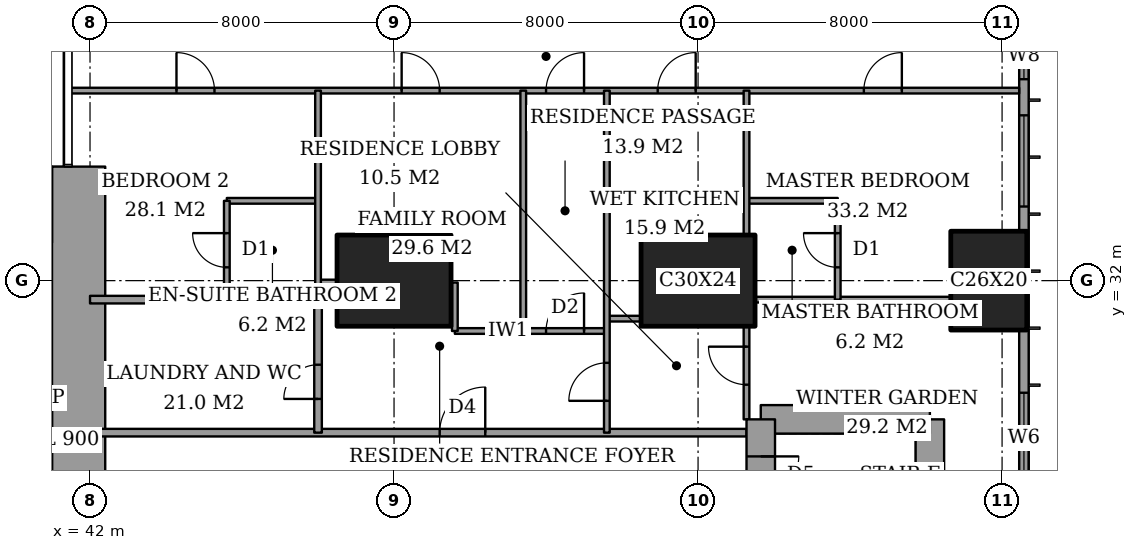
"""IFC4 building model, lengths in metres.
Left out: names, types, materials, properties, quantities, classifications, styles, units other than length and angle.
Written with IfcOpenShell. Run it as: python <this file> out.ifc"""

import sys

from ifc_helpers import new_model, si_unit, direction, frame, frame_2d, origin, origin_2d, place, context, subcontext, project, spatial, rectangle, extrude, element, fill, save


model = new_model("IFC4")
c1 = context("Model", 3, precision=1e-05, world=origin(), true_north=direction((0.0, 1.0)))
c2 = subcontext(c1, "Body", "Model", "MODEL_VIEW")
j1 = project(units=[si_unit("LENGTHUNIT", "METRE"), si_unit("PLANEANGLEUNIT", "RADIAN")], contexts=[c1])
p1 = place(None, origin())
s1 = spatial("IfcSite", under=j1, at=p1, CompositionType="ELEMENT")
p2 = place(p1, origin())
s2 = spatial("IfcBuilding", under=s1, at=p2, CompositionType="ELEMENT")
p3 = place(p2, frame((0.0, 0.0, 54.8)))
s3 = spatial("IfcBuildingStorey", under=s2, at=p3, CompositionType="ELEMENT", Elevation=54.8)
for number, where, z_axis, x_axis in (
    (1, (50.0, 32.0, 0.0), (0.0, 0.0, 1.0), (1.0, 0.0, 0.0)),
    (2, (58.0, 32.0, 0.0), (0.0, 0.0, 1.0), (1.0, 0.0, 0.0)),
):
    element("IfcColumn", number, at=place(p3, frame(where, z_axis=z_axis, x_axis=x_axis)), inside=s3, PredefinedType="COLUMN", context=c2, shape_type="SweptSolid", body=[
        extrude(rectangle(XDim=3.0, YDim=2.4, at=origin_2d()), origin(), (0.0, 0.0, 1.0), 3.6),
    ])
p4 = place(p3, frame((65.65, 32.0, 0.0), z_axis=(0.0, 0.0, 1.0), x_axis=(0.0, 1.0, 0.0)))
e3 = element("IfcColumn", 3, at=p4, inside=s3, PredefinedType="COLUMN", context=c2, shape_type="SweptSolid", body=[
    extrude(rectangle(XDim=2.6, YDim=2.0, at=origin_2d()), origin(), (0.0, 0.0, 1.0), 3.6),
])
p5 = place(p3, frame((41.7, 24.85, 0.0), z_axis=(0.0, 0.0, 1.0), x_axis=(0.0, 1.0, 0.0)))
e4 = element("IfcWall", 4, at=p5, inside=s3, PredefinedType="SHEAR", context=c2, shape_type="SweptSolid", body=[
    extrude(rectangle(XDim=10.15, YDim=1.4, at=frame_2d((5.075, 0.0))), origin(), (0.0, 0.0, 1.0), 3.6),
])
p6 = place(p3, frame((64.1, 19.65, 0.0), z_axis=(0.0, 0.0, 1.0), x_axis=(0.0, 1.0, 0.0)))
e5 = element("IfcWall", 5, at=p6, inside=s3, PredefinedType="SHEAR", context=c2, shape_type="SweptSolid", body=[
    extrude(rectangle(XDim=8.7, YDim=0.75, at=frame_2d((4.35, 0.0))), origin(), (0.0, 0.0, 1.0), 3.6),
])
p7 = place(p3, frame((64.1, 28.35, 0.0), z_axis=(0.0, 0.0, 1.0), x_axis=(-1.0, 0.0, 0.0)))
e6 = element("IfcWall", 6, at=p7, inside=s3, PredefinedType="SHEAR", context=c2, shape_type="SweptSolid", body=[
    extrude(rectangle(XDim=4.45, YDim=0.75, at=frame_2d((2.225, 0.0))), origin(), (0.0, 0.0, 1.0), 3.6),
])
p8 = place(p3, frame((59.65, 28.35, 0.0), z_axis=(0.0, 0.0, 1.0), x_axis=(0.0, -1.0, 0.0)))
e7 = element("IfcWall", 7, at=p8, inside=s3, PredefinedType="SHEAR", context=c2, shape_type="SweptSolid", body=[
    extrude(rectangle(XDim=8.7, YDim=0.75, at=frame_2d((4.35, 0.0))), origin(), (0.0, 0.0, 1.0), 3.6),
])
p9 = place(p8, frame((0.975, 0.0, 0.0)))
e8 = element("IfcOpeningElement", 8, at=p9, cuts=e7, PredefinedType="OPENING", context=c2, shape_type="SweptSolid", body=[
    extrude(rectangle(XDim=1.0, YDim=2.1, at=frame_2d((0.5, 1.05))), frame((0.0, 0.385, 0.0), z_axis=(0.0, -1.0, 0.0), x_axis=(1.0, 0.0, 0.0)), (0.0, 0.0, 1.0), 0.77),
])
p10 = place(p3, frame((66.575, 3.175, 0.0), z_axis=(0.0, 0.0, 1.0), x_axis=(0.0, 1.0, 0.0)))
e9 = element("IfcWall", 9, at=p10, inside=s3, PredefinedType="SOLIDWALL", context=c2, shape_type="SweptSolid", body=[
    extrude(rectangle(XDim=41.65, YDim=0.25, at=frame_2d((20.825, 0.0))), origin(), (0.0, 0.0, 1.0), 3.6),
])
p11 = place(p10, frame((0.775, 0.0, 0.6)))
e10 = element("IfcOpeningElement", 10, at=p11, cuts=e9, PredefinedType="OPENING", context=c2, shape_type="SweptSolid", body=[
    extrude(rectangle(XDim=2.4, YDim=2.0, at=frame_2d((1.2, 1.0))), frame((0.0, 0.135, 0.0), z_axis=(0.0, -1.0, 0.0), x_axis=(1.0, 0.0, 0.0)), (0.0, 0.0, 1.0), 0.27),
])
p12 = place(p10, frame((6.125, 0.0, 0.6)))
e11 = element("IfcOpeningElement", 11, at=p12, cuts=e9, PredefinedType="OPENING", context=c2, shape_type="SweptSolid", body=[
    extrude(rectangle(XDim=1.2, YDim=2.0, at=frame_2d((0.6, 1.0))), frame((0.0, 0.135, 0.0), z_axis=(0.0, -1.0, 0.0), x_axis=(1.0, 0.0, 0.0)), (0.0, 0.0, 1.0), 0.27),
])
p13 = place(p10, frame((8.375, 0.0, 0.6)))
e12 = element("IfcOpeningElement", 12, at=p13, cuts=e9, PredefinedType="OPENING", context=c2, shape_type="SweptSolid", body=[
    extrude(rectangle(XDim=2.4, YDim=2.0, at=frame_2d((1.2, 1.0))), frame((0.0, 0.135, 0.0), z_axis=(0.0, -1.0, 0.0), x_axis=(1.0, 0.0, 0.0)), (0.0, 0.0, 1.0), 0.27),
])
p14 = place(p10, frame((15.775, 0.0, 0.6)))
e13 = element("IfcOpeningElement", 13, at=p14, cuts=e9, PredefinedType="OPENING", context=c2, shape_type="SweptSolid", body=[
    extrude(rectangle(XDim=2.4, YDim=2.0, at=frame_2d((1.2, 1.0))), frame((0.0, 0.135, 0.0), z_axis=(0.0, -1.0, 0.0), x_axis=(1.0, 0.0, 0.0)), (0.0, 0.0, 1.0), 0.27),
])
p15 = place(p10, frame((23.475, 0.0, 0.6)))
e14 = element("IfcOpeningElement", 14, at=p15, cuts=e9, PredefinedType="OPENING", context=c2, shape_type="SweptSolid", body=[
    extrude(rectangle(XDim=2.4, YDim=2.0, at=frame_2d((1.2, 1.0))), frame((0.0, 0.135, 0.0), z_axis=(0.0, -1.0, 0.0), x_axis=(1.0, 0.0, 0.0)), (0.0, 0.0, 1.0), 0.27),
])
p16 = place(p10, frame((30.775, 0.0, 0.6)))
e15 = element("IfcOpeningElement", 15, at=p16, cuts=e9, PredefinedType="OPENING", context=c2, shape_type="SweptSolid", body=[
    extrude(rectangle(XDim=2.4, YDim=2.0, at=frame_2d((1.2, 1.0))), frame((0.0, 0.135, 0.0), z_axis=(0.0, -1.0, 0.0), x_axis=(1.0, 0.0, 0.0)), (0.0, 0.0, 1.0), 0.27),
])
p17 = place(p10, frame((34.125, 0.0, 0.6)))
e16 = element("IfcOpeningElement", 16, at=p17, cuts=e9, PredefinedType="OPENING", context=c2, shape_type="SweptSolid", body=[
    extrude(rectangle(XDim=1.2, YDim=2.0, at=frame_2d((0.6, 1.0))), frame((0.0, 0.135, 0.0), z_axis=(0.0, -1.0, 0.0), x_axis=(1.0, 0.0, 0.0)), (0.0, 0.0, 1.0), 0.27),
])
p18 = place(p10, frame((38.475, 0.0, 0.6)))
e17 = element("IfcOpeningElement", 17, at=p18, cuts=e9, PredefinedType="OPENING", context=c2, shape_type="SweptSolid", body=[
    extrude(rectangle(XDim=2.4, YDim=2.0, at=frame_2d((1.2, 1.0))), frame((0.0, 0.135, 0.0), z_axis=(0.0, -1.0, 0.0), x_axis=(1.0, 0.0, 0.0)), (0.0, 0.0, 1.0), 0.27),
])
p19 = place(p3, frame((42.0, 28.0, 0.0), z_axis=(0.0, 0.0, 1.0), x_axis=(1.0, 0.0, 0.0)))
e18 = element("IfcWall", 18, at=p19, inside=s3, PredefinedType="PARTITIONING", context=c2, shape_type="SweptSolid", body=[
    extrude(rectangle(XDim=17.275, YDim=0.2, at=frame_2d((8.637, 0.0))), origin(), (0.0, 0.0, 1.0), 3.35),
])
p20 = place(p19, frame((9.2, 0.0, 0.0)))
e19 = element("IfcOpeningElement", 19, at=p20, cuts=e18, PredefinedType="OPENING", context=c2, shape_type="SweptSolid", body=[
    extrude(rectangle(XDim=1.2, YDim=2.4, at=frame_2d((0.6, 1.2))), frame((0.0, 0.11, 0.0), z_axis=(0.0, -1.0, 0.0), x_axis=(1.0, 0.0, 0.0)), (0.0, 0.0, 1.0), 0.22),
])
p21 = place(p3, frame((51.6, 30.675, 0.0), z_axis=(0.0, 0.0, 1.0), x_axis=(1.0, 0.0, 0.0)))
e20 = element("IfcWall", 20, at=p21, inside=s3, PredefinedType="PARTITIONING", context=c2, shape_type="SweptSolid", body=[
    extrude(rectangle(XDim=4.0, YDim=0.15, at=frame_2d((2.0, 0.0))), origin(), (0.0, 0.0, 1.0), 3.35),
])
p22 = place(p21, frame((2.4, 0.0, 0.0)))
e21 = element("IfcOpeningElement", 21, at=p22, cuts=e20, PredefinedType="OPENING", context=c2, shape_type="SweptSolid", body=[
    extrude(rectangle(XDim=1.0, YDim=2.1, at=frame_2d((0.5, 1.05))), frame((0.0, 0.085, 0.0), z_axis=(0.0, -1.0, 0.0), x_axis=(1.0, 0.0, 0.0)), (0.0, 0.0, 1.0), 0.17),
])
p23 = place(p3, frame((55.6, 31.0, 0.0), z_axis=(0.0, 0.0, 1.0), x_axis=(1.0, 0.0, 0.0)))
e22 = element("IfcWall", 22, at=p23, inside=s3, PredefinedType="PARTITIONING", context=c2, shape_type="SweptSolid", body=[
    extrude(rectangle(XDim=0.9, YDim=0.15, at=frame_2d((0.45, 0.0))), origin(), (0.0, 0.0, 1.0), 3.35),
])
p24 = place(p3, frame((42.0, 31.5, 0.0), z_axis=(0.0, 0.0, 1.0), x_axis=(1.0, 0.0, 0.0)))
e23 = element("IfcWall", 23, at=p24, inside=s3, PredefinedType="PARTITIONING", context=c2, shape_type="SweptSolid", body=[
    extrude(rectangle(XDim=6.0, YDim=0.2, at=frame_2d((3.0, 0.0))), origin(), (0.0, 0.0, 1.0), 3.35),
])
p25 = place(p3, frame((59.5, 31.5, 0.0), z_axis=(0.0, 0.0, 1.0), x_axis=(1.0, 0.0, 0.0)))
e24 = element("IfcWall", 24, at=p25, inside=s3, PredefinedType="PARTITIONING", context=c2, shape_type="SweptSolid", body=[
    extrude(rectangle(XDim=5.15, YDim=0.15, at=frame_2d((2.575, 0.0))), origin(), (0.0, 0.0, 1.0), 3.35),
])
p26 = place(p3, frame((48.0, 31.95, 0.0), z_axis=(0.0, 0.0, 1.0), x_axis=(1.0, 0.0, 0.0)))
e25 = element("IfcWall", 25, at=p26, inside=s3, PredefinedType="PARTITIONING", context=c2, shape_type="SweptSolid", body=[
    extrude(rectangle(XDim=0.5, YDim=0.15, at=frame_2d((0.25, 0.0))), origin(), (0.0, 0.0, 1.0), 2.634),
])
p27 = place(p3, frame((45.6, 34.1, 0.0), z_axis=(0.0, 0.0, 1.0), x_axis=(1.0, 0.0, 0.0)))
e26 = element("IfcWall", 26, at=p27, inside=s3, PredefinedType="PARTITIONING", context=c2, shape_type="SweptSolid", body=[
    extrude(rectangle(XDim=2.4, YDim=0.15, at=frame_2d((1.2, 0.0))), origin(), (0.0, 0.0, 1.0), 3.35),
])
p28 = place(p3, frame((59.275, 34.1, 0.0), z_axis=(0.0, 0.0, 1.0), x_axis=(1.0, 0.0, 0.0)))
e27 = element("IfcWall", 27, at=p28, inside=s3, PredefinedType="PARTITIONING", context=c2, shape_type="SweptSolid", body=[
    extrude(rectangle(XDim=2.4, YDim=0.15, at=frame_2d((1.2, 0.0))), origin(), (0.0, 0.0, 1.0), 3.35),
])
p29 = place(p3, frame((41.439, 37.0, 0.0), z_axis=(0.0, 0.0, 1.0), x_axis=(1.0, 0.0, 0.0)))
e28 = element("IfcWall", 28, at=p29, inside=s3, PredefinedType="PARTITIONING", context=c2, shape_type="SweptSolid", body=[
    extrude(rectangle(XDim=25.011, YDim=0.15, at=frame_2d((12.505, 0.0))), origin(), (0.0, 0.0, 1.0), 3.35),
])
p30 = place(p29, frame((12.561, 0.0, 0.0)))
e29 = element("IfcOpeningElement", 29, at=p30, cuts=e28, PredefinedType="OPENING", context=c2, shape_type="SweptSolid", body=[
    extrude(rectangle(XDim=1.0, YDim=2.1, at=frame_2d((0.5, 1.05))), frame((0.0, 0.085, 0.0), z_axis=(0.0, -1.0, 0.0), x_axis=(1.0, 0.0, 0.0)), (0.0, 0.0, 1.0), 0.17),
])
p31 = place(p29, frame((20.924, 0.0, 0.0)))
e30 = element("IfcOpeningElement", 30, at=p31, cuts=e28, PredefinedType="OPENING", context=c2, shape_type="SweptSolid", body=[
    extrude(rectangle(XDim=1.0, YDim=2.1, at=frame_2d((0.5, 1.05))), frame((0.0, 0.085, 0.0), z_axis=(0.0, -1.0, 0.0), x_axis=(1.0, 0.0, 0.0)), (0.0, 0.0, 1.0), 0.17),
])
p32 = place(p29, frame((15.499, 0.0, 0.0)))
e31 = element("IfcOpeningElement", 31, at=p32, cuts=e28, PredefinedType="OPENING", context=c2, shape_type="SweptSolid", body=[
    extrude(rectangle(XDim=1.0, YDim=2.1, at=frame_2d((0.5, 1.05))), frame((0.0, 0.085, 0.0), z_axis=(0.0, -1.0, 0.0), x_axis=(1.0, 0.0, 0.0)), (0.0, 0.0, 1.0), 0.17),
])
p33 = place(p29, frame((8.761, 0.0, 0.0)))
e32 = element("IfcOpeningElement", 32, at=p33, cuts=e28, PredefinedType="OPENING", context=c2, shape_type="SweptSolid", body=[
    extrude(rectangle(XDim=1.0, YDim=2.1, at=frame_2d((0.5, 1.05))), frame((0.0, 0.085, 0.0), z_axis=(0.0, -1.0, 0.0), x_axis=(1.0, 0.0, 0.0)), (0.0, 0.0, 1.0), 0.17),
])
p34 = place(p29, frame((2.836, 0.0, 0.0)))
e33 = element("IfcOpeningElement", 33, at=p34, cuts=e28, PredefinedType="OPENING", context=c2, shape_type="SweptSolid", body=[
    extrude(rectangle(XDim=1.0, YDim=2.1, at=frame_2d((0.5, 1.05))), frame((0.0, 0.085, 0.0), z_axis=(0.0, -1.0, 0.0), x_axis=(1.0, 0.0, 0.0)), (0.0, 0.0, 1.0), 0.17),
])
p35 = place(p3, frame((45.6, 31.5, 0.0), z_axis=(0.0, 0.0, 1.0), x_axis=(0.0, 1.0, 0.0)))
e34 = element("IfcWall", 34, at=p35, inside=s3, PredefinedType="PARTITIONING", context=c2, shape_type="SweptSolid", body=[
    extrude(rectangle(XDim=2.6, YDim=0.15, at=frame_2d((1.3, 0.0))), origin(), (0.0, 0.0, 1.0), 3.35),
])
p36 = place(p35, frame((0.85, 0.0, 0.0)))
e35 = element("IfcOpeningElement", 35, at=p36, cuts=e34, PredefinedType="OPENING", context=c2, shape_type="SweptSolid", body=[
    extrude(rectangle(XDim=0.9, YDim=2.1, at=frame_2d((0.45, 1.05))), frame((0.0, 0.085, 0.0), z_axis=(0.0, -1.0, 0.0), x_axis=(1.0, 0.0, 0.0)), (0.0, 0.0, 1.0), 0.17),
])
p37 = place(p3, frame((48.0, 28.0, 0.0), z_axis=(0.0, 0.0, 1.0), x_axis=(0.0, 1.0, 0.0)))
e36 = element("IfcWall", 36, at=p37, inside=s3, PredefinedType="PARTITIONING", context=c2, shape_type="SweptSolid", body=[
    extrude(rectangle(XDim=3.5, YDim=0.2, at=frame_2d((1.75, 0.0))), origin(), (0.0, 0.0, 1.0), 3.35),
])
p38 = place(p37, frame((0.887, 0.0, 0.0)))
e37 = element("IfcOpeningElement", 37, at=p38, cuts=e36, PredefinedType="OPENING", context=c2, shape_type="SweptSolid", body=[
    extrude(rectangle(XDim=0.9, YDim=2.1, at=frame_2d((0.45, 1.05))), frame((0.0, 0.11, 0.0), z_axis=(0.0, -1.0, 0.0), x_axis=(1.0, 0.0, 0.0)), (0.0, 0.0, 1.0), 0.22),
])
p39 = place(p3, frame((48.0, 31.5, 0.0), z_axis=(0.0, 0.0, 1.0), x_axis=(0.0, 1.0, 0.0)))
e38 = element("IfcWall", 38, at=p39, inside=s3, PredefinedType="PARTITIONING", context=c2, shape_type="SweptSolid", body=[
    extrude(rectangle(XDim=5.5, YDim=0.15, at=frame_2d((2.75, 0.0))), origin(), (0.0, 0.0, 1.0), 3.35),
])
p40 = place(p3, frame((51.6, 30.675, 0.0), z_axis=(0.0, 0.0, 1.0), x_axis=(0.0, 1.0, 0.0)))
e39 = element("IfcWall", 39, at=p40, inside=s3, PredefinedType="PARTITIONING", context=c2, shape_type="SweptSolid", body=[
    extrude(rectangle(XDim=1.275, YDim=0.15, at=frame_2d((0.637, 0.0))), origin(), (0.0, 0.0, 1.0), 3.35),
])
p41 = place(p3, frame((53.4, 30.675, 0.0), z_axis=(0.0, 0.0, 1.0), x_axis=(0.0, 1.0, 0.0)))
e40 = element("IfcWall", 40, at=p41, inside=s3, PredefinedType="PARTITIONING", context=c2, shape_type="SweptSolid", body=[
    extrude(rectangle(XDim=6.325, YDim=0.15, at=frame_2d((3.163, 0.0))), origin(), (0.0, 0.0, 1.0), 3.35),
])
p42 = place(p3, frame((55.6, 28.0, 0.0), z_axis=(0.0, 0.0, 1.0), x_axis=(0.0, 1.0, 0.0)))
e41 = element("IfcWall", 41, at=p42, inside=s3, PredefinedType="PARTITIONING", context=c2, shape_type="SweptSolid", body=[
    extrude(rectangle(XDim=9.0, YDim=0.15, at=frame_2d((4.5, 0.0))), origin(), (0.0, 0.0, 1.0), 3.35),
])
p43 = place(p42, frame((0.837, 0.0, 0.0)))
e42 = element("IfcOpeningElement", 42, at=p43, cuts=e41, PredefinedType="OPENING", context=c2, shape_type="SweptSolid", body=[
    extrude(rectangle(XDim=1.0, YDim=2.1, at=frame_2d((0.5, 1.05))), frame((0.0, 0.085, 0.0), z_axis=(0.0, -1.0, 0.0), x_axis=(1.0, 0.0, 0.0)), (0.0, 0.0, 1.0), 0.17),
])
p44 = place(p3, frame((59.275, 28.35, 0.0), z_axis=(0.0, 0.0, 1.0), x_axis=(0.0, 1.0, 0.0)))
e43 = element("IfcWall", 43, at=p44, inside=s3, PredefinedType="PARTITIONING", context=c2, shape_type="SweptSolid", body=[
    extrude(rectangle(XDim=2.45, YDim=0.15, at=frame_2d((1.225, 0.0))), origin(), (0.0, 0.0, 1.0), 3.35),
])
p45 = place(p44, frame((0.913, 0.0, 0.0)))
e44 = element("IfcOpeningElement", 44, at=p45, cuts=e43, PredefinedType="OPENING", context=c2, shape_type="SweptSolid", body=[
    extrude(rectangle(XDim=1.0, YDim=2.1, at=frame_2d((0.5, 1.05))), frame((0.0, 0.085, 0.0), z_axis=(0.0, -1.0, 0.0), x_axis=(1.0, 0.0, 0.0)), (0.0, 0.0, 1.0), 0.17),
])
p46 = place(p3, frame((59.275, 33.2, 0.0), z_axis=(0.0, 0.0, 1.0), x_axis=(0.0, 1.0, 0.0)))
e45 = element("IfcWall", 45, at=p46, inside=s3, PredefinedType="PARTITIONING", context=c2, shape_type="SweptSolid", body=[
    extrude(rectangle(XDim=3.8, YDim=0.15, at=frame_2d((1.9, 0.0))), origin(), (0.0, 0.0, 1.0), 3.35),
])
p47 = place(p3, frame((61.675, 31.5, 0.0), z_axis=(0.0, 0.0, 1.0), x_axis=(0.0, 1.0, 0.0)))
e46 = element("IfcWall", 46, at=p47, inside=s3, PredefinedType="PARTITIONING", context=c2, shape_type="SweptSolid", body=[
    extrude(rectangle(XDim=2.6, YDim=0.15, at=frame_2d((1.3, 0.0))), origin(), (0.0, 0.0, 1.0), 3.35),
])
p48 = place(p47, frame((0.85, 0.0, 0.0)))
e47 = element("IfcOpeningElement", 47, at=p48, cuts=e46, PredefinedType="OPENING", context=c2, shape_type="SweptSolid", body=[
    extrude(rectangle(XDim=0.9, YDim=2.1, at=frame_2d((0.45, 1.05))), frame((0.0, 0.085, 0.0), z_axis=(0.0, -1.0, 0.0), x_axis=(1.0, 0.0, 0.0)), (0.0, 0.0, 1.0), 0.17),
])
p49 = place(p15, origin())
e48 = element("IfcWindow", 48, at=p49, inside=s3, PartitioningType="SINGLE_PANEL", PredefinedType="WINDOW", context=c2, shape_type="SweptSolid", body=[
    extrude(rectangle(XDim=2.4, YDim=2.0, at=frame_2d((1.2, 1.0))), frame((0.0, 0.03, 0.0), z_axis=(0.0, -1.0, 0.0), x_axis=(1.0, 0.0, 0.0)), (0.0, 0.0, 1.0), 0.06),
])
fill(e14, e48)
p50 = place(p16, origin())
e49 = element("IfcWindow", 49, at=p50, inside=s3, PartitioningType="SINGLE_PANEL", PredefinedType="WINDOW", context=c2, shape_type="SweptSolid", body=[
    extrude(rectangle(XDim=2.4, YDim=2.0, at=frame_2d((1.2, 1.0))), frame((0.0, 0.03, 0.0), z_axis=(0.0, -1.0, 0.0), x_axis=(1.0, 0.0, 0.0)), (0.0, 0.0, 1.0), 0.06),
])
fill(e15, e49)
p51 = place(p17, origin())
e50 = element("IfcWindow", 50, at=p51, inside=s3, PartitioningType="SINGLE_PANEL", PredefinedType="WINDOW", context=c2, shape_type="SweptSolid", body=[
    extrude(rectangle(XDim=1.2, YDim=2.0, at=frame_2d((0.6, 1.0))), frame((0.0, 0.03, 0.0), z_axis=(0.0, -1.0, 0.0), x_axis=(1.0, 0.0, 0.0)), (0.0, 0.0, 1.0), 0.06),
])
fill(e16, e50)
p52 = place(p30, origin())
e51 = element("IfcDoor", 51, at=p52, inside=s3, OperationType="SINGLE_SWING_LEFT", PredefinedType="DOOR", context=c2, shape_type="SweptSolid", body=[
    extrude(rectangle(XDim=1.0, YDim=2.1, at=frame_2d((0.5, 1.05))), frame((0.0, 0.025, 0.0), z_axis=(0.0, -1.0, 0.0), x_axis=(1.0, 0.0, 0.0)), (0.0, 0.0, 1.0), 0.05),
])
fill(e29, e51)
p53 = place(p48, origin())
e52 = element("IfcDoor", 52, at=p53, inside=s3, OperationType="SINGLE_SWING_LEFT", PredefinedType="DOOR", context=c2, shape_type="SweptSolid", body=[
    extrude(rectangle(XDim=0.9, YDim=2.1, at=frame_2d((0.45, 1.05))), frame((0.0, 0.025, 0.0), z_axis=(0.0, -1.0, 0.0), x_axis=(1.0, 0.0, 0.0)), (0.0, 0.0, 1.0), 0.05),
])
fill(e47, e52)
p54 = place(p31, origin())
e53 = element("IfcDoor", 53, at=p54, inside=s3, OperationType="SINGLE_SWING_LEFT", PredefinedType="DOOR", context=c2, shape_type="SweptSolid", body=[
    extrude(rectangle(XDim=1.0, YDim=2.1, at=frame_2d((0.5, 1.05))), frame((0.0, 0.025, 0.0), z_axis=(0.0, -1.0, 0.0), x_axis=(1.0, 0.0, 0.0)), (0.0, 0.0, 1.0), 0.05),
])
fill(e30, e53)
p55 = place(p45, origin())
e54 = element("IfcDoor", 54, at=p55, inside=s3, OperationType="SINGLE_SWING_LEFT", PredefinedType="DOOR", context=c2, shape_type="SweptSolid", body=[
    extrude(rectangle(XDim=1.0, YDim=2.1, at=frame_2d((0.5, 1.05))), frame((0.0, 0.025, 0.0), z_axis=(0.0, -1.0, 0.0), x_axis=(1.0, 0.0, 0.0)), (0.0, 0.0, 1.0), 0.05),
])
fill(e44, e54)
p56 = place(p32, origin())
e55 = element("IfcDoor", 55, at=p56, inside=s3, OperationType="SINGLE_SWING_LEFT", PredefinedType="DOOR", context=c2, shape_type="SweptSolid", body=[
    extrude(rectangle(XDim=1.0, YDim=2.1, at=frame_2d((0.5, 1.05))), frame((0.0, 0.025, 0.0), z_axis=(0.0, -1.0, 0.0), x_axis=(1.0, 0.0, 0.0)), (0.0, 0.0, 1.0), 0.05),
])
fill(e31, e55)
p57 = place(p43, origin())
e56 = element("IfcDoor", 56, at=p57, inside=s3, OperationType="SINGLE_SWING_RIGHT", PredefinedType="DOOR", context=c2, shape_type="SweptSolid", body=[
    extrude(rectangle(XDim=1.0, YDim=2.1, at=frame_2d((0.5, 1.05))), frame((0.0, 0.025, 0.0), z_axis=(0.0, -1.0, 0.0), x_axis=(1.0, 0.0, 0.0)), (0.0, 0.0, 1.0), 0.05),
])
fill(e42, e56)
p58 = place(p20, origin())
e57 = element("IfcDoor", 57, at=p58, inside=s3, OperationType="SINGLE_SWING_LEFT", PredefinedType="DOOR", context=c2, shape_type="SweptSolid", body=[
    extrude(rectangle(XDim=1.2, YDim=2.4, at=frame_2d((0.6, 1.2))), frame((0.0, 0.025, 0.0), z_axis=(0.0, -1.0, 0.0), x_axis=(1.0, 0.0, 0.0)), (0.0, 0.0, 1.0), 0.05),
])
fill(e19, e57)
p59 = place(p22, origin())
e58 = element("IfcDoor", 58, at=p59, inside=s3, OperationType="SINGLE_SWING_LEFT", PredefinedType="DOOR", context=c2, shape_type="SweptSolid", body=[
    extrude(rectangle(XDim=1.0, YDim=2.1, at=frame_2d((0.5, 1.05))), frame((0.0, 0.025, 0.0), z_axis=(0.0, -1.0, 0.0), x_axis=(1.0, 0.0, 0.0)), (0.0, 0.0, 1.0), 0.05),
])
fill(e21, e58)
p60 = place(p33, origin())
e59 = element("IfcDoor", 59, at=p60, inside=s3, OperationType="SINGLE_SWING_RIGHT", PredefinedType="DOOR", context=c2, shape_type="SweptSolid", body=[
    extrude(rectangle(XDim=1.0, YDim=2.1, at=frame_2d((0.5, 1.05))), frame((0.0, 0.025, 0.0), z_axis=(0.0, -1.0, 0.0), x_axis=(1.0, 0.0, 0.0)), (0.0, 0.0, 1.0), 0.05),
])
fill(e32, e59)
p61 = place(p36, origin())
e60 = element("IfcDoor", 60, at=p61, inside=s3, OperationType="SINGLE_SWING_LEFT", PredefinedType="DOOR", context=c2, shape_type="SweptSolid", body=[
    extrude(rectangle(XDim=0.9, YDim=2.1, at=frame_2d((0.45, 1.05))), frame((0.0, 0.025, 0.0), z_axis=(0.0, -1.0, 0.0), x_axis=(1.0, 0.0, 0.0)), (0.0, 0.0, 1.0), 0.05),
])
fill(e35, e60)
p62 = place(p34, origin())
e61 = element("IfcDoor", 61, at=p62, inside=s3, OperationType="SINGLE_SWING_RIGHT", PredefinedType="DOOR", context=c2, shape_type="SweptSolid", body=[
    extrude(rectangle(XDim=1.0, YDim=2.1, at=frame_2d((0.5, 1.05))), frame((0.0, 0.025, 0.0), z_axis=(0.0, -1.0, 0.0), x_axis=(1.0, 0.0, 0.0)), (0.0, 0.0, 1.0), 0.05),
])
fill(e33, e61)
p63 = place(p38, origin())
e62 = element("IfcDoor", 62, at=p63, inside=s3, OperationType="SINGLE_SWING_RIGHT", PredefinedType="DOOR", context=c2, shape_type="SweptSolid", body=[
    extrude(rectangle(XDim=0.9, YDim=2.1, at=frame_2d((0.45, 1.05))), frame((0.0, 0.025, 0.0), z_axis=(0.0, -1.0, 0.0), x_axis=(1.0, 0.0, 0.0)), (0.0, 0.0, 1.0), 0.05),
])
fill(e37, e62)
p64 = place(p9, origin())
e63 = element("IfcDoor", 63, at=p64, inside=s3, OperationType="SINGLE_SWING_RIGHT", PredefinedType="DOOR", context=c2, shape_type="SweptSolid", body=[
    extrude(rectangle(XDim=1.0, YDim=2.1, at=frame_2d((0.5, 1.05))), frame((0.0, 0.025, 0.0), z_axis=(0.0, -1.0, 0.0), x_axis=(1.0, 0.0, 0.0)), (0.0, 0.0, 1.0), 0.05),
])
fill(e8, e63)
save(model, sys.argv[1])
